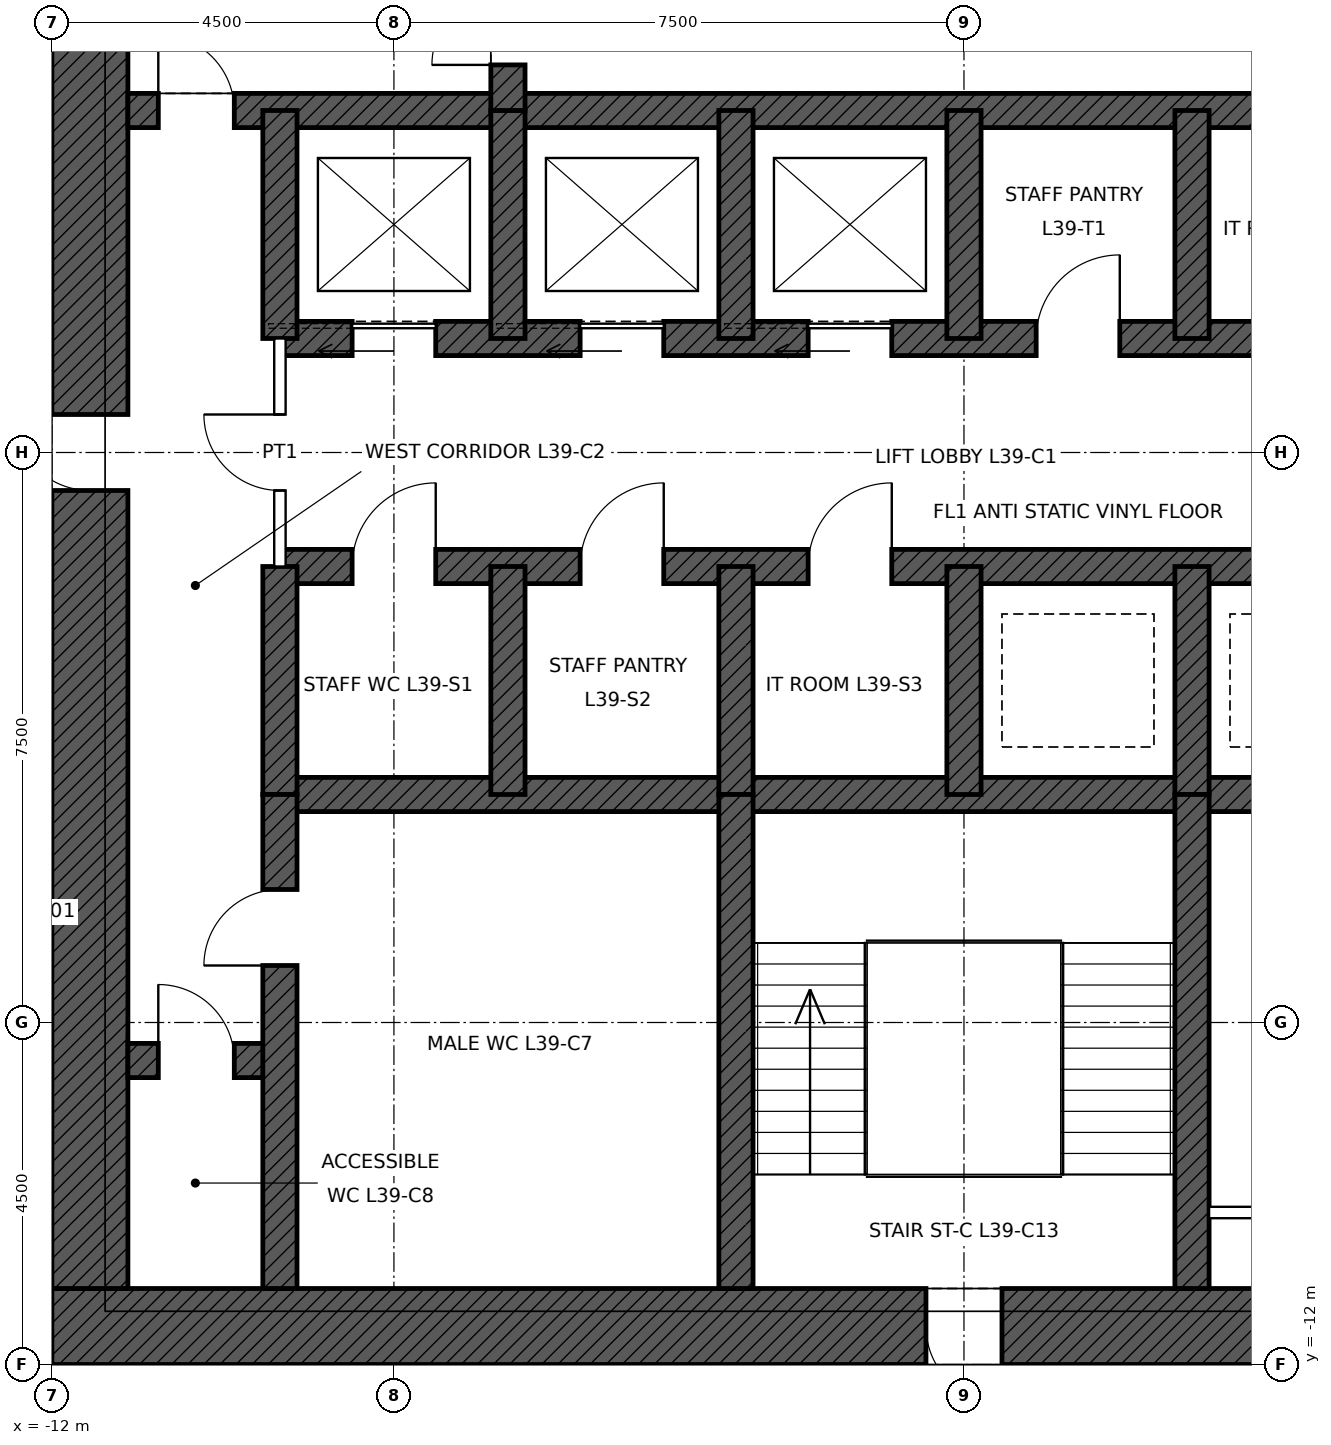
"""IFC4 building model, lengths in metres.
Left out: names, types, materials, properties, quantities, classifications, styles, units other than length and angle.
Written with IfcOpenShell. Run it as: python <this file> out.ifc"""

import sys

from ifc_helpers import new_model, si_unit, direction, frame, frame_2d, origin, place, context, subcontext, project, spatial, rectangle, extrude, element, fill, save


model = new_model("IFC4")
c1 = context("Model", 3, precision=1e-05, world=origin(), true_north=direction((0.0, 1.0)))
c2 = subcontext(c1, "Body", "Model", "MODEL_VIEW")
j1 = project(units=[si_unit("LENGTHUNIT", "METRE"), si_unit("PLANEANGLEUNIT", "RADIAN")], contexts=[c1])
p1 = place(None, origin())
s1 = spatial("IfcSite", under=j1, at=p1, CompositionType="ELEMENT")
p2 = place(p1, origin())
s2 = spatial("IfcBuilding", under=s1, at=p2, CompositionType="ELEMENT")
p3 = place(p2, frame((0.0, 0.0, 189.9)))
s3 = spatial("IfcBuildingStorey", under=s2, at=p3, CompositionType="ELEMENT", Elevation=189.9)
p4 = place(p3, frame((12.0, -11.5, 0.0), z_axis=(0.0, 0.0, 1.0), x_axis=(-1.0, 0.0, 0.0)))
e1 = element("IfcWall", 1, at=p4, inside=s3, PredefinedType="SHEAR", context=c2, shape_type="SweptSolid", body=[
    extrude(rectangle(XDim=24.0, YDim=1.0, at=frame_2d((12.0, 0.0))), origin(), (0.0, 0.0, 1.0), 4.0),
])
p5 = place(p4, frame((11.5, 0.0, 0.0)))
e2 = element("IfcOpeningElement", 2, at=p5, cuts=e1, PredefinedType="OPENING", context=c2, shape_type="SweptSolid", body=[
    extrude(rectangle(XDim=1.0, YDim=2.1, at=frame_2d((0.5, 1.05))), frame((0.0, 0.51, 0.0), z_axis=(0.0, -1.0, 0.0), x_axis=(1.0, 0.0, 0.0)), (0.0, 0.0, 1.0), 1.02),
])
p6 = place(p4, frame((1.0, 0.0, 0.0)))
e3 = element("IfcOpeningElement", 3, at=p6, cuts=e1, PredefinedType="OPENING", context=c2, shape_type="SweptSolid", body=[
    extrude(rectangle(XDim=1.0, YDim=2.4, at=frame_2d((0.5, 1.2))), frame((0.0, 0.51, 0.0), z_axis=(0.0, -1.0, 0.0), x_axis=(1.0, 0.0, 0.0)), (0.0, 0.0, 1.0), 1.02),
])
p7 = place(p3, frame((-11.5, -11.0, 0.0), z_axis=(0.0, 0.0, 1.0), x_axis=(0.0, 1.0, 0.0)))
e4 = element("IfcWall", 4, at=p7, inside=s3, PredefinedType="SHEAR", context=c2, shape_type="SweptSolid", body=[
    extrude(rectangle(XDim=22.0, YDim=1.0, at=frame_2d((11.0, 0.0))), origin(), (0.0, 0.0, 1.0), 4.0),
])
p8 = place(p7, frame((10.5, 0.0, 0.0)))
e5 = element("IfcOpeningElement", 5, at=p8, cuts=e4, PredefinedType="OPENING", context=c2, shape_type="SweptSolid", body=[
    extrude(rectangle(XDim=1.0, YDim=2.4, at=frame_2d((0.5, 1.2))), frame((0.0, 0.51, 0.0), z_axis=(0.0, -1.0, 0.0), x_axis=(1.0, 0.0, 0.0)), (0.0, 0.0, 1.0), 1.02),
])
p9 = place(p3, frame((-11.0, 4.5, 0.0), z_axis=(0.0, 0.0, 1.0), x_axis=(1.0, 0.0, 0.0)))
e6 = element("IfcWall", 6, at=p9, inside=s3, PredefinedType="SHEAR", context=c2, shape_type="SweptSolid", body=[
    extrude(rectangle(XDim=22.0, YDim=0.45, at=frame_2d((11.0, 0.0))), origin(), (0.0, 0.0, 1.0), 4.0),
])
p10 = place(p9, frame((0.4, 0.0, 0.0)))
e7 = element("IfcOpeningElement", 7, at=p10, cuts=e6, PredefinedType="OPENING", context=c2, shape_type="SweptSolid", body=[
    extrude(rectangle(XDim=1.0, YDim=2.1, at=frame_2d((0.5, 1.05))), frame((0.0, 0.235, 0.0), z_axis=(0.0, -1.0, 0.0), x_axis=(1.0, 0.0, 0.0)), (0.0, 0.0, 1.0), 0.47),
])
p11 = place(p9, frame((20.6, 0.0, 0.0)))
e8 = element("IfcOpeningElement", 8, at=p11, cuts=e6, PredefinedType="OPENING", context=c2, shape_type="SweptSolid", body=[
    extrude(rectangle(XDim=1.0, YDim=2.1, at=frame_2d((0.5, 1.05))), frame((0.0, 0.235, 0.0), z_axis=(0.0, -1.0, 0.0), x_axis=(1.0, 0.0, 0.0)), (0.0, 0.0, 1.0), 0.47),
])
p12 = place(p3, frame((-9.0, 1.5, 0.0), z_axis=(0.0, 0.0, 1.0), x_axis=(1.0, 0.0, 0.0)))
e9 = element("IfcWall", 9, at=p12, inside=s3, PredefinedType="SHEAR", context=c2, shape_type="SweptSolid", body=[
    extrude(rectangle(XDim=18.0, YDim=0.45, at=frame_2d((9.0, 0.0))), origin(), (0.0, 0.0, 1.0), 4.0),
])
p13 = place(p12, frame((0.95, 0.0, 0.0)))
e10 = element("IfcOpeningElement", 10, at=p13, cuts=e9, PredefinedType="OPENING", context=c2, shape_type="SweptSolid", body=[
    extrude(rectangle(XDim=1.1, YDim=2.1, at=frame_2d((0.55, 1.05))), frame((0.0, 0.235, 0.0), z_axis=(0.0, -1.0, 0.0), x_axis=(1.0, 0.0, 0.0)), (0.0, 0.0, 1.0), 0.47),
])
p14 = place(p12, frame((3.95, 0.0, 0.0)))
e11 = element("IfcOpeningElement", 11, at=p14, cuts=e9, PredefinedType="OPENING", context=c2, shape_type="SweptSolid", body=[
    extrude(rectangle(XDim=1.1, YDim=2.1, at=frame_2d((0.55, 1.05))), frame((0.0, 0.235, 0.0), z_axis=(0.0, -1.0, 0.0), x_axis=(1.0, 0.0, 0.0)), (0.0, 0.0, 1.0), 0.47),
])
p15 = place(p12, frame((6.95, 0.0, 0.0)))
e12 = element("IfcOpeningElement", 12, at=p15, cuts=e9, PredefinedType="OPENING", context=c2, shape_type="SweptSolid", body=[
    extrude(rectangle(XDim=1.1, YDim=2.1, at=frame_2d((0.55, 1.05))), frame((0.0, 0.235, 0.0), z_axis=(0.0, -1.0, 0.0), x_axis=(1.0, 0.0, 0.0)), (0.0, 0.0, 1.0), 0.47),
])
p16 = place(p12, frame((9.95, 0.0, 0.0)))
e13 = element("IfcOpeningElement", 13, at=p16, cuts=e9, PredefinedType="OPENING", context=c2, shape_type="SweptSolid", body=[
    extrude(rectangle(XDim=1.1, YDim=2.1, at=frame_2d((0.55, 1.05))), frame((0.0, 0.235, 0.0), z_axis=(0.0, -1.0, 0.0), x_axis=(1.0, 0.0, 0.0)), (0.0, 0.0, 1.0), 0.47),
])
p17 = place(p12, frame((12.95, 0.0, 0.0)))
e14 = element("IfcOpeningElement", 14, at=p17, cuts=e9, PredefinedType="OPENING", context=c2, shape_type="SweptSolid", body=[
    extrude(rectangle(XDim=1.1, YDim=2.1, at=frame_2d((0.55, 1.05))), frame((0.0, 0.235, 0.0), z_axis=(0.0, -1.0, 0.0), x_axis=(1.0, 0.0, 0.0)), (0.0, 0.0, 1.0), 0.47),
])
p18 = place(p12, frame((15.95, 0.0, 0.0)))
e15 = element("IfcOpeningElement", 15, at=p18, cuts=e9, PredefinedType="OPENING", context=c2, shape_type="SweptSolid", body=[
    extrude(rectangle(XDim=1.1, YDim=2.1, at=frame_2d((0.55, 1.05))), frame((0.0, 0.235, 0.0), z_axis=(0.0, -1.0, 0.0), x_axis=(1.0, 0.0, 0.0)), (0.0, 0.0, 1.0), 0.47),
])
p19 = place(p3, frame((-9.0, -1.5, 0.0), z_axis=(0.0, 0.0, 1.0), x_axis=(1.0, 0.0, 0.0)))
e16 = element("IfcWall", 16, at=p19, inside=s3, PredefinedType="SHEAR", context=c2, shape_type="SweptSolid", body=[
    extrude(rectangle(XDim=18.0, YDim=0.45, at=frame_2d((9.0, 0.0))), origin(), (0.0, 0.0, 1.0), 4.0),
])
p20 = place(p19, frame((0.95, 0.0, 0.0)))
e17 = element("IfcOpeningElement", 17, at=p20, cuts=e16, PredefinedType="OPENING", context=c2, shape_type="SweptSolid", body=[
    extrude(rectangle(XDim=1.1, YDim=2.1, at=frame_2d((0.55, 1.05))), frame((0.0, 0.235, 0.0), z_axis=(0.0, -1.0, 0.0), x_axis=(1.0, 0.0, 0.0)), (0.0, 0.0, 1.0), 0.47),
])
p21 = place(p19, frame((3.95, 0.0, 0.0)))
e18 = element("IfcOpeningElement", 18, at=p21, cuts=e16, PredefinedType="OPENING", context=c2, shape_type="SweptSolid", body=[
    extrude(rectangle(XDim=1.1, YDim=2.1, at=frame_2d((0.55, 1.05))), frame((0.0, 0.235, 0.0), z_axis=(0.0, -1.0, 0.0), x_axis=(1.0, 0.0, 0.0)), (0.0, 0.0, 1.0), 0.47),
])
p22 = place(p19, frame((6.95, 0.0, 0.0)))
e19 = element("IfcOpeningElement", 19, at=p22, cuts=e16, PredefinedType="OPENING", context=c2, shape_type="SweptSolid", body=[
    extrude(rectangle(XDim=1.1, YDim=2.1, at=frame_2d((0.55, 1.05))), frame((0.0, 0.235, 0.0), z_axis=(0.0, -1.0, 0.0), x_axis=(1.0, 0.0, 0.0)), (0.0, 0.0, 1.0), 0.47),
])
p23 = place(p3, frame((-9.0, -4.5, 0.0), z_axis=(0.0, 0.0, 1.0), x_axis=(1.0, 0.0, 0.0)))
e20 = element("IfcWall", 20, at=p23, inside=s3, PredefinedType="SHEAR", context=c2, shape_type="SweptSolid", body=[
    extrude(rectangle(XDim=18.0, YDim=0.45, at=frame_2d((9.0, 0.0))), origin(), (0.0, 0.0, 1.0), 4.0),
])
p24 = place(p3, frame((-11.0, -8.0, 0.0), z_axis=(0.0, 0.0, 1.0), x_axis=(1.0, 0.0, 0.0)))
e21 = element("IfcWall", 21, at=p24, inside=s3, PredefinedType="SHEAR", context=c2, shape_type="SweptSolid", body=[
    extrude(rectangle(XDim=2.0, YDim=0.45, at=frame_2d((1.0, 0.0))), origin(), (0.0, 0.0, 1.0), 4.0),
])
p25 = place(p24, frame((0.4, 0.0, 0.0)))
e22 = element("IfcOpeningElement", 22, at=p25, cuts=e21, PredefinedType="OPENING", context=c2, shape_type="SweptSolid", body=[
    extrude(rectangle(XDim=1.0, YDim=2.1, at=frame_2d((0.5, 1.05))), frame((0.0, 0.235, 0.0), z_axis=(0.0, -1.0, 0.0), x_axis=(1.0, 0.0, 0.0)), (0.0, 0.0, 1.0), 0.47),
])
for number, where, z_axis, x_axis in (
    (23, (-9.0, 1.5, 0.0), (0.0, 0.0, 1.0), (0.0, 1.0, 0.0)),
    (24, (-9.0, -4.5, 0.0), (0.0, 0.0, 1.0), (0.0, 1.0, 0.0)),
    (25, (-6.0, 1.5, 0.0), (0.0, 0.0, 1.0), (0.0, 1.0, 0.0)),
    (26, (-3.0, 1.5, 0.0), (0.0, 0.0, 1.0), (0.0, 1.0, 0.0)),
    (27, (0.0, 1.5, 0.0), (0.0, 0.0, 1.0), (0.0, 1.0, 0.0)),
    (28, (3.0, 1.5, 0.0), (0.0, 0.0, 1.0), (0.0, 1.0, 0.0)),
    (29, (-6.0, -4.5, 0.0), (0.0, 0.0, 1.0), (0.0, 1.0, 0.0)),
    (30, (-3.0, -4.5, 0.0), (0.0, 0.0, 1.0), (0.0, 1.0, 0.0)),
    (31, (0.0, -4.5, 0.0), (0.0, 0.0, 1.0), (0.0, 1.0, 0.0)),
    (32, (3.0, -4.5, 0.0), (0.0, 0.0, 1.0), (0.0, 1.0, 0.0)),
):
    element("IfcWall", number, at=place(p3, frame(where, z_axis=z_axis, x_axis=x_axis)), inside=s3, PredefinedType="SHEAR", context=c2, shape_type="SweptSolid", body=[
        extrude(rectangle(XDim=3.0, YDim=0.45, at=frame_2d((1.5, 0.0))), origin(), (0.0, 0.0, 1.0), 4.0),
    ])
p26 = place(p3, frame((-6.0, 4.5, 0.0), z_axis=(0.0, 0.0, 1.0), x_axis=(0.0, 1.0, 0.0)))
e33 = element("IfcWall", 33, at=p26, inside=s3, PredefinedType="SHEAR", context=c2, shape_type="SweptSolid", body=[
    extrude(rectangle(XDim=6.5, YDim=0.45, at=frame_2d((3.25, 0.0))), origin(), (0.0, 0.0, 1.0), 4.0),
])
p27 = place(p26, frame((0.6, 0.0, 0.0)))
e34 = element("IfcOpeningElement", 34, at=p27, cuts=e33, PredefinedType="OPENING", context=c2, shape_type="SweptSolid", body=[
    extrude(rectangle(XDim=1.0, YDim=2.1, at=frame_2d((0.5, 1.05))), frame((0.0, 0.235, 0.0), z_axis=(0.0, -1.0, 0.0), x_axis=(1.0, 0.0, 0.0)), (0.0, 0.0, 1.0), 0.47),
])
p28 = place(p3, frame((-9.0, -11.0, 0.0), z_axis=(0.0, 0.0, 1.0), x_axis=(0.0, 1.0, 0.0)))
e35 = element("IfcWall", 35, at=p28, inside=s3, PredefinedType="SHEAR", context=c2, shape_type="SweptSolid", body=[
    extrude(rectangle(XDim=6.5, YDim=0.45, at=frame_2d((3.25, 0.0))), origin(), (0.0, 0.0, 1.0), 4.0),
])
p29 = place(p28, frame((4.25, 0.0, 0.0)))
e36 = element("IfcOpeningElement", 36, at=p29, cuts=e35, PredefinedType="OPENING", context=c2, shape_type="SweptSolid", body=[
    extrude(rectangle(XDim=1.0, YDim=2.1, at=frame_2d((0.5, 1.05))), frame((0.0, 0.235, 0.0), z_axis=(0.0, -1.0, 0.0), x_axis=(1.0, 0.0, 0.0)), (0.0, 0.0, 1.0), 0.47),
])
for number, where, z_axis, x_axis in (
    (37, (-3.0, -11.0, 0.0), (0.0, 0.0, 1.0), (0.0, 1.0, 0.0)),
    (38, (3.0, -11.0, 0.0), (0.0, 0.0, 1.0), (0.0, 1.0, 0.0)),
):
    element("IfcWall", number, at=place(p3, frame(where, z_axis=z_axis, x_axis=x_axis)), inside=s3, PredefinedType="SHEAR", context=c2, shape_type="SweptSolid", body=[
        extrude(rectangle(XDim=6.5, YDim=0.45, at=frame_2d((3.25, 0.0))), origin(), (0.0, 0.0, 1.0), 4.0),
    ])
p30 = place(p3, frame((3.225, -10.0, 0.0), z_axis=(0.0, 0.0, 1.0), x_axis=(1.0, 0.0, 0.0)))
e39 = element("IfcWall", 39, at=p30, inside=s3, PredefinedType="PARTITIONING", context=c2, shape_type="SweptSolid", body=[
    extrude(rectangle(XDim=5.55, YDim=0.15, at=frame_2d((2.775, 0.0))), origin(), (0.0, 0.0, 1.0), 3.75),
])
p31 = place(p30, frame((2.275, 0.0, 0.0)))
e40 = element("IfcOpeningElement", 40, at=p31, cuts=e39, PredefinedType="OPENING", context=c2, shape_type="SweptSolid", body=[
    extrude(rectangle(XDim=1.0, YDim=2.1, at=frame_2d((0.5, 1.05))), frame((0.0, 0.085, 0.0), z_axis=(0.0, -1.0, 0.0), x_axis=(1.0, 0.0, 0.0)), (0.0, 0.0, 1.0), 0.17),
])
p32 = place(p3, frame((-9.0, -1.5, 0.0), z_axis=(0.0, 0.0, 1.0), x_axis=(0.0, 1.0, 0.0)))
e41 = element("IfcWall", 41, at=p32, inside=s3, PredefinedType="PARTITIONING", context=c2, shape_type="SweptSolid", body=[
    extrude(rectangle(XDim=3.0, YDim=0.15, at=frame_2d((1.5, 0.0))), origin(), (0.0, 0.0, 1.0), 3.75),
])
p33 = place(p32, frame((1.0, 0.0, 0.0)))
e42 = element("IfcOpeningElement", 42, at=p33, cuts=e41, PredefinedType="OPENING", context=c2, shape_type="SweptSolid", body=[
    extrude(rectangle(XDim=1.0, YDim=2.4, at=frame_2d((0.5, 1.2))), frame((0.0, 0.085, 0.0), z_axis=(0.0, -1.0, 0.0), x_axis=(1.0, 0.0, 0.0)), (0.0, 0.0, 1.0), 0.17),
])
p34 = place(p10, origin())
e43 = element("IfcDoor", 43, at=p34, inside=s3, OperationType="SINGLE_SWING_LEFT", PredefinedType="DOOR", context=c2, shape_type="SweptSolid", body=[
    extrude(rectangle(XDim=1.0, YDim=2.1, at=frame_2d((0.5, 1.05))), frame((0.0, 0.025, 0.0), z_axis=(0.0, -1.0, 0.0), x_axis=(1.0, 0.0, 0.0)), (0.0, 0.0, 1.0), 0.05),
])
fill(e7, e43)
p35 = place(p27, origin())
e44 = element("IfcDoor", 44, at=p35, inside=s3, OperationType="SINGLE_SWING_LEFT", PredefinedType="DOOR", context=c2, shape_type="SweptSolid", body=[
    extrude(rectangle(XDim=1.0, YDim=2.1, at=frame_2d((0.5, 1.05))), frame((0.0, 0.025, 0.0), z_axis=(0.0, -1.0, 0.0), x_axis=(1.0, 0.0, 0.0)), (0.0, 0.0, 1.0), 0.05),
])
fill(e34, e44)
p36 = place(p5, origin())
e45 = element("IfcDoor", 45, at=p36, inside=s3, OperationType="SINGLE_SWING_LEFT", PredefinedType="DOOR", context=c2, shape_type="SweptSolid", body=[
    extrude(rectangle(XDim=1.0, YDim=2.1, at=frame_2d((0.5, 1.05))), frame((0.0, 0.485, 0.0), z_axis=(0.0, -1.0, 0.0), x_axis=(1.0, 0.0, 0.0)), (0.0, 0.0, 1.0), 0.05),
])
fill(e2, e45)
p37 = place(p8, origin())
e46 = element("IfcDoor", 46, at=p37, inside=s3, OperationType="SINGLE_SWING_RIGHT", PredefinedType="DOOR", context=c2, shape_type="SweptSolid", body=[
    extrude(rectangle(XDim=1.0, YDim=2.4, at=frame_2d((0.5, 1.2))), frame((0.0, 0.485, 0.0), z_axis=(0.0, -1.0, 0.0), x_axis=(1.0, 0.0, 0.0)), (0.0, 0.0, 1.0), 0.05),
])
fill(e5, e46)
p38 = place(p29, origin())
e47 = element("IfcDoor", 47, at=p38, inside=s3, OperationType="SINGLE_SWING_LEFT", PredefinedType="DOOR", context=c2, shape_type="SweptSolid", body=[
    extrude(rectangle(XDim=1.0, YDim=2.1, at=frame_2d((0.5, 1.05))), frame((0.0, 0.025, 0.0), z_axis=(0.0, -1.0, 0.0), x_axis=(1.0, 0.0, 0.0)), (0.0, 0.0, 1.0), 0.05),
])
fill(e36, e47)
p39 = place(p25, origin())
e48 = element("IfcDoor", 48, at=p39, inside=s3, OperationType="SINGLE_SWING_LEFT", PredefinedType="DOOR", context=c2, shape_type="SweptSolid", body=[
    extrude(rectangle(XDim=1.0, YDim=2.1, at=frame_2d((0.5, 1.05))), frame((0.0, 0.025, 0.0), z_axis=(0.0, -1.0, 0.0), x_axis=(1.0, 0.0, 0.0)), (0.0, 0.0, 1.0), 0.05),
])
fill(e22, e48)
p40 = place(p13, origin())
e49 = element("IfcDoor", 49, at=p40, inside=s3, OperationType="SLIDING_TO_LEFT", PredefinedType="DOOR", context=c2, shape_type="SweptSolid", body=[
    extrude(rectangle(XDim=1.1, YDim=2.1, at=frame_2d((0.55, 1.05))), frame((0.0, 0.025, 0.0), z_axis=(0.0, -1.0, 0.0), x_axis=(1.0, 0.0, 0.0)), (0.0, 0.0, 1.0), 0.05),
])
fill(e10, e49)
p41 = place(p14, origin())
e50 = element("IfcDoor", 50, at=p41, inside=s3, OperationType="SLIDING_TO_LEFT", PredefinedType="DOOR", context=c2, shape_type="SweptSolid", body=[
    extrude(rectangle(XDim=1.1, YDim=2.1, at=frame_2d((0.55, 1.05))), frame((0.0, 0.025, 0.0), z_axis=(0.0, -1.0, 0.0), x_axis=(1.0, 0.0, 0.0)), (0.0, 0.0, 1.0), 0.05),
])
fill(e11, e50)
p42 = place(p15, origin())
e51 = element("IfcDoor", 51, at=p42, inside=s3, OperationType="SLIDING_TO_LEFT", PredefinedType="DOOR", context=c2, shape_type="SweptSolid", body=[
    extrude(rectangle(XDim=1.1, YDim=2.1, at=frame_2d((0.55, 1.05))), frame((0.0, 0.025, 0.0), z_axis=(0.0, -1.0, 0.0), x_axis=(1.0, 0.0, 0.0)), (0.0, 0.0, 1.0), 0.05),
])
fill(e12, e51)
p43 = place(p33, origin())
e52 = element("IfcDoor", 52, at=p43, inside=s3, OperationType="SINGLE_SWING_RIGHT", PredefinedType="DOOR", context=c2, shape_type="SweptSolid", body=[
    extrude(rectangle(XDim=1.0, YDim=2.4, at=frame_2d((0.5, 1.2))), frame((0.0, 0.025, 0.0), z_axis=(0.0, -1.0, 0.0), x_axis=(1.0, 0.0, 0.0)), (0.0, 0.0, 1.0), 0.05),
])
fill(e42, e52)
p44 = place(p16, origin())
e53 = element("IfcDoor", 53, at=p44, inside=s3, OperationType="SINGLE_SWING_RIGHT", PredefinedType="DOOR", context=c2, shape_type="SweptSolid", body=[
    extrude(rectangle(XDim=1.1, YDim=2.1, at=frame_2d((0.55, 1.05))), frame((0.0, 0.025, 0.0), z_axis=(0.0, -1.0, 0.0), x_axis=(1.0, 0.0, 0.0)), (0.0, 0.0, 1.0), 0.05),
])
fill(e13, e53)
p45 = place(p20, origin())
e54 = element("IfcDoor", 54, at=p45, inside=s3, OperationType="SINGLE_SWING_RIGHT", PredefinedType="DOOR", context=c2, shape_type="SweptSolid", body=[
    extrude(rectangle(XDim=1.1, YDim=2.1, at=frame_2d((0.55, 1.05))), frame((0.0, 0.025, 0.0), z_axis=(0.0, -1.0, 0.0), x_axis=(1.0, 0.0, 0.0)), (0.0, 0.0, 1.0), 0.05),
])
fill(e17, e54)
p46 = place(p21, origin())
e55 = element("IfcDoor", 55, at=p46, inside=s3, OperationType="SINGLE_SWING_RIGHT", PredefinedType="DOOR", context=c2, shape_type="SweptSolid", body=[
    extrude(rectangle(XDim=1.1, YDim=2.1, at=frame_2d((0.55, 1.05))), frame((0.0, 0.025, 0.0), z_axis=(0.0, -1.0, 0.0), x_axis=(1.0, 0.0, 0.0)), (0.0, 0.0, 1.0), 0.05),
])
fill(e18, e55)
p47 = place(p22, origin())
e56 = element("IfcDoor", 56, at=p47, inside=s3, OperationType="SINGLE_SWING_RIGHT", PredefinedType="DOOR", context=c2, shape_type="SweptSolid", body=[
    extrude(rectangle(XDim=1.1, YDim=2.1, at=frame_2d((0.55, 1.05))), frame((0.0, 0.025, 0.0), z_axis=(0.0, -1.0, 0.0), x_axis=(1.0, 0.0, 0.0)), (0.0, 0.0, 1.0), 0.05),
])
fill(e19, e56)
save(model, sys.argv[1])
